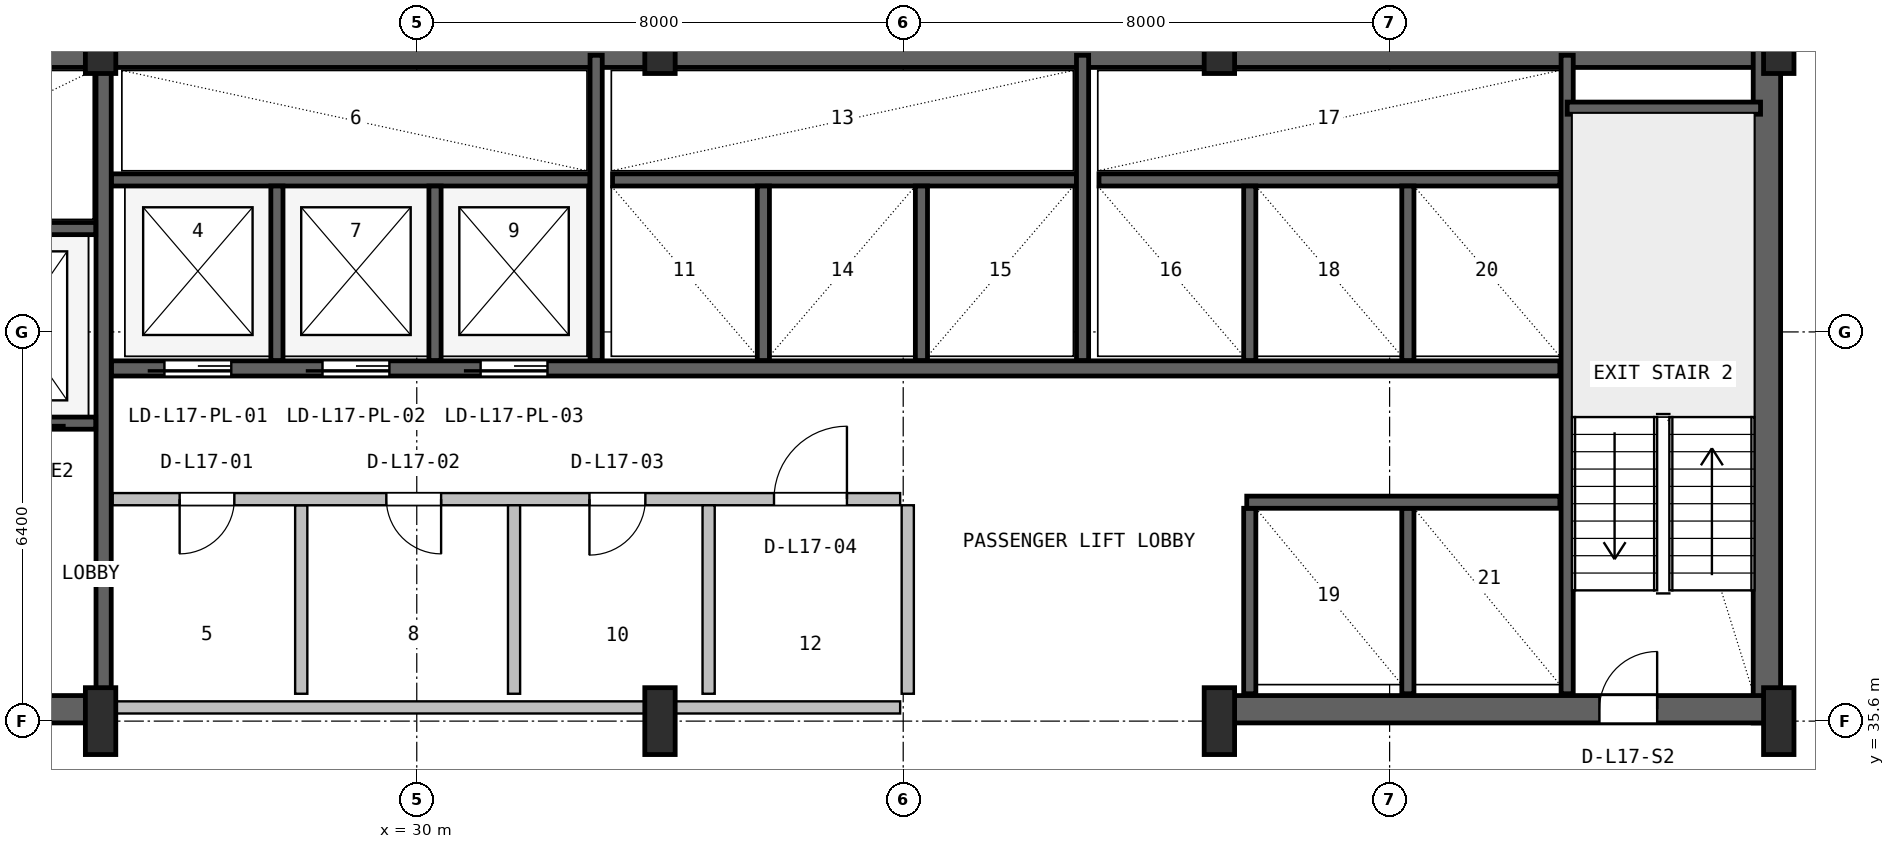
"""IFC4 building model, lengths in metres.
Left out: names, types, materials, properties, quantities, classifications, styles, units other than length and angle.
Written with IfcOpenShell. Run it as: python <this file> out.ifc"""

import sys

from ifc_helpers import new_model, si_unit, direction, frame, frame_2d, origin, origin_2d, place, context, subcontext, project, spatial, rectangle, i_section, extrude, source, transform, mapped, element, fill, save


model = new_model("IFC4")
c1 = context("Model", 3, precision=1e-05, world=origin(), true_north=direction((0.0, 1.0)))
c2 = subcontext(c1, "Body", "Model", "MODEL_VIEW")
j1 = project(units=[si_unit("LENGTHUNIT", "METRE"), si_unit("PLANEANGLEUNIT", "RADIAN")], contexts=[c1])
p1 = place(None, origin())
s1 = spatial("IfcSite", under=j1, at=p1, CompositionType="ELEMENT")
p2 = place(p1, origin())
s2 = spatial("IfcBuilding", under=s1, at=p2, CompositionType="ELEMENT")
p3 = place(p2, frame((0.0, 0.0, 74.4)))
s3 = spatial("IfcBuildingStorey", under=s2, at=p3, CompositionType="ELEMENT", Elevation=74.4)
p4 = place(p3, frame((15.6, 46.575, 0.0), z_axis=(0.0, 0.0, 1.0), x_axis=(1.0, 0.0, 0.0)))
e1 = element("IfcWall", 1, at=p4, inside=s3, PredefinedType="SHEAR", context=c2, shape_type="SweptSolid", body=[
    extrude(rectangle(XDim=36.8, YDim=0.45, at=frame_2d((18.4, 0.0))), origin(), (0.0, 0.0, 1.0), 3.65),
])
p5 = place(p3, frame((52.205, 35.57, 0.0), z_axis=(0.0, 0.0, 1.0), x_axis=(0.0, 1.0, 0.0)))
e2 = element("IfcWall", 2, at=p5, inside=s3, PredefinedType="SHEAR", context=c2, shape_type="SweptSolid", body=[
    extrude(rectangle(XDim=11.23, YDim=0.45, at=frame_2d((5.615, 0.0))), origin(), (0.0, 0.0, 1.0), 3.65),
])
p6 = place(p3, frame((15.57, 35.795, 0.0), z_axis=(0.0, 0.0, 1.0), x_axis=(1.0, 0.0, 0.0)))
e3 = element("IfcWall", 3, at=p6, inside=s3, PredefinedType="SHEAR", context=c2, shape_type="SweptSolid", body=[
    extrude(rectangle(XDim=9.23, YDim=0.45, at=frame_2d((4.615, 0.0))), origin(), (0.0, 0.0, 1.0), 3.65),
])
p7 = place(p6, frame((5.4, 0.0, 0.0)))
e4 = element("IfcOpeningElement", 4, at=p7, cuts=e3, PredefinedType="OPENING", context=c2, shape_type="SweptSolid", body=[
    extrude(rectangle(XDim=1.0, YDim=2.1, at=frame_2d((0.5, 1.05))), frame((0.0, 0.235, 0.0), z_axis=(0.0, -1.0, 0.0), x_axis=(1.0, 0.0, 0.0)), (0.0, 0.0, 1.0), 0.47),
])
p8 = place(p3, frame((43.2, 35.795, 0.0), z_axis=(0.0, 0.0, 1.0), x_axis=(1.0, 0.0, 0.0)))
e5 = element("IfcWall", 5, at=p8, inside=s3, PredefinedType="SHEAR", context=c2, shape_type="SweptSolid", body=[
    extrude(rectangle(XDim=9.23, YDim=0.45, at=frame_2d((4.615, 0.0))), origin(), (0.0, 0.0, 1.0), 3.65),
])
p9 = place(p8, frame((6.25, 0.0, 0.0)))
e6 = element("IfcOpeningElement", 6, at=p9, cuts=e5, PredefinedType="OPENING", context=c2, shape_type="SweptSolid", body=[
    extrude(rectangle(XDim=0.95, YDim=2.1, at=frame_2d((0.475, 1.05))), frame((0.0, 0.235, 0.0), z_axis=(0.0, -1.0, 0.0), x_axis=(1.0, 0.0, 0.0)), (0.0, 0.0, 1.0), 0.47),
])
m1 = source(origin(), c2, "Body", "SweptSolid", [
    extrude(i_section(OverallWidth=0.5, OverallDepth=1.1, WebThickness=0.018, FlangeThickness=0.032, FilletRadius=0.018, at=origin_2d()), origin(), (0.0, 0.0, 1.0), 3.9),
])
for number, where, z_axis, x_axis in (
    (7, (24.8, 35.6, 0.0), (0.0, 0.0, 1.0), (1.0, 0.0, 0.0)),
    (8, (24.8, 46.8, 0.0), (0.0, 0.0, 1.0), (1.0, 0.0, 0.0)),
    (9, (34.0, 35.6, 0.0), (0.0, 0.0, 1.0), (1.0, 0.0, 0.0)),
    (10, (34.0, 46.8, 0.0), (0.0, 0.0, 1.0), (1.0, 0.0, 0.0)),
    (11, (43.2, 35.6, 0.0), (0.0, 0.0, 1.0), (1.0, 0.0, 0.0)),
    (12, (43.2, 46.8, 0.0), (0.0, 0.0, 1.0), (1.0, 0.0, 0.0)),
    (13, (52.4, 35.6, 0.0), (0.0, 0.0, 1.0), (1.0, 0.0, 0.0)),
    (14, (52.4, 46.8, 0.0), (0.0, 0.0, 1.0), (1.0, 0.0, 0.0)),
):
    element("IfcColumn", number, at=place(p3, frame(where, z_axis=z_axis, x_axis=x_axis)), inside=s3, PredefinedType="COLUMN", context=c2, shape_type="MappedRepresentation", body=[
        mapped(m1, transform((0.0, 0.0, 0.0), x_axis=(1.0, 0.0, 0.0), y_axis=(0.0, 1.0, 0.0), z_axis=(0.0, 0.0, 1.0), scale=1.0)),
    ])
p10 = place(p3, frame((24.85, 36.05, 0.0), z_axis=(0.0, 0.0, 1.0), x_axis=(0.0, 1.0, 0.0)))
e15 = element("IfcWall", 15, at=p10, inside=s3, PredefinedType="SHEAR", context=c2, shape_type="SweptSolid", body=[
    extrude(rectangle(XDim=10.45, YDim=0.25, at=frame_2d((5.225, 0.0))), origin(), (0.0, 0.0, 1.0), 3.65),
])
p11 = place(p3, frame((19.2, 40.5, 0.0), z_axis=(0.0, 0.0, 1.0), x_axis=(1.0, 0.0, 0.0)))
e16 = element("IfcWall", 16, at=p11, inside=s3, PredefinedType="SHEAR", context=c2, shape_type="SweptSolid", body=[
    extrude(rectangle(XDim=5.52, YDim=0.2, at=frame_2d((2.76, 0.0))), origin(), (0.0, 0.0, 1.0), 3.65),
])
p12 = place(p11, frame((1.05, 0.0, 0.0)))
e17 = element("IfcOpeningElement", 17, at=p12, cuts=e16, PredefinedType="OPENING", context=c2, shape_type="SweptSolid", body=[
    extrude(rectangle(XDim=1.1, YDim=2.18, at=frame_2d((0.55, 1.09))), frame((0.0, 0.11, 0.0), z_axis=(0.0, -1.0, 0.0), x_axis=(1.0, 0.0, 0.0)), (0.0, 0.0, 1.0), 0.22),
])
p13 = place(p11, frame((3.65, 0.0, 0.0)))
e18 = element("IfcOpeningElement", 18, at=p13, cuts=e16, PredefinedType="OPENING", context=c2, shape_type="SweptSolid", body=[
    extrude(rectangle(XDim=1.1, YDim=2.18, at=frame_2d((0.55, 1.09))), frame((0.0, 0.11, 0.0), z_axis=(0.0, -1.0, 0.0), x_axis=(1.0, 0.0, 0.0)), (0.0, 0.0, 1.0), 0.22),
])
p14 = place(p3, frame((19.2, 43.7, 0.0), z_axis=(0.0, 0.0, 1.0), x_axis=(1.0, 0.0, 0.0)))
e19 = element("IfcWall", 19, at=p14, inside=s3, PredefinedType="SHEAR", context=c2, shape_type="SweptSolid", body=[
    extrude(rectangle(XDim=5.52, YDim=0.2, at=frame_2d((2.76, 0.0))), origin(), (0.0, 0.0, 1.0), 3.65),
])
p15 = place(p3, frame((48.92, 36.05, 0.0), z_axis=(0.0, 0.0, 1.0), x_axis=(0.0, 1.0, 0.0)))
e20 = element("IfcWall", 20, at=p15, inside=s3, PredefinedType="SHEAR", context=c2, shape_type="SweptSolid", body=[
    extrude(rectangle(XDim=10.5, YDim=0.2, at=frame_2d((5.25, 0.0))), origin(), (0.0, 0.0, 1.0), 3.65),
])
p16 = place(p3, frame((48.92, 45.68, 0.0), z_axis=(0.0, 0.0, 1.0), x_axis=(1.0, 0.0, 0.0)))
e21 = element("IfcWall", 21, at=p16, inside=s3, PredefinedType="SHEAR", context=c2, shape_type="SweptSolid", body=[
    extrude(rectangle(XDim=3.18, YDim=0.2, at=frame_2d((1.59, 0.0))), origin(), (0.0, 0.0, 1.0), 3.65),
])
p17 = place(p3, frame((24.98, 41.4, 0.0), z_axis=(0.0, 0.0, 1.0), x_axis=(1.0, 0.0, 0.0)))
e22 = element("IfcWall", 22, at=p17, inside=s3, PredefinedType="SHEAR", context=c2, shape_type="SweptSolid", body=[
    extrude(rectangle(XDim=23.82, YDim=0.25, at=frame_2d((11.91, 0.0))), origin(), (0.0, 0.0, 1.0), 3.65),
])
p18 = place(p17, frame((0.87, 0.0, 0.0)))
e23 = element("IfcOpeningElement", 23, at=p18, cuts=e22, PredefinedType="OPENING", context=c2, shape_type="SweptSolid", body=[
    extrude(rectangle(XDim=1.1, YDim=2.18, at=frame_2d((0.55, 1.09))), frame((0.0, 0.135, 0.0), z_axis=(0.0, -1.0, 0.0), x_axis=(1.0, 0.0, 0.0)), (0.0, 0.0, 1.0), 0.27),
])
p19 = place(p17, frame((3.47, 0.0, 0.0)))
e24 = element("IfcOpeningElement", 24, at=p19, cuts=e22, PredefinedType="OPENING", context=c2, shape_type="SweptSolid", body=[
    extrude(rectangle(XDim=1.1, YDim=2.18, at=frame_2d((0.55, 1.09))), frame((0.0, 0.135, 0.0), z_axis=(0.0, -1.0, 0.0), x_axis=(1.0, 0.0, 0.0)), (0.0, 0.0, 1.0), 0.27),
])
p20 = place(p17, frame((6.07, 0.0, 0.0)))
e25 = element("IfcOpeningElement", 25, at=p20, cuts=e22, PredefinedType="OPENING", context=c2, shape_type="SweptSolid", body=[
    extrude(rectangle(XDim=1.1, YDim=2.18, at=frame_2d((0.55, 1.09))), frame((0.0, 0.135, 0.0), z_axis=(0.0, -1.0, 0.0), x_axis=(1.0, 0.0, 0.0)), (0.0, 0.0, 1.0), 0.27),
])
p21 = place(p3, frame((24.98, 44.5, 0.0), z_axis=(0.0, 0.0, 1.0), x_axis=(1.0, 0.0, 0.0)))
e26 = element("IfcWall", 26, at=p21, inside=s3, PredefinedType="SHEAR", context=c2, shape_type="SweptSolid", body=[
    extrude(rectangle(XDim=7.87, YDim=0.2, at=frame_2d((3.935, 0.0))), origin(), (0.0, 0.0, 1.0), 3.65),
])
for number, where, z_axis, x_axis in (
    (27, (27.7, 41.53, 0.0), (0.0, 0.0, 1.0), (0.0, 1.0, 0.0)),
    (28, (30.3, 41.53, 0.0), (0.0, 0.0, 1.0), (0.0, 1.0, 0.0)),
):
    element("IfcWall", number, at=place(p3, frame(where, z_axis=z_axis, x_axis=x_axis)), inside=s3, PredefinedType="SHEAR", context=c2, shape_type="SweptSolid", body=[
        extrude(rectangle(XDim=2.87, YDim=0.2, at=frame_2d((1.435, 0.0))), origin(), (0.0, 0.0, 1.0), 3.65),
    ])
p22 = place(p3, frame((32.95, 41.53, 0.0), z_axis=(0.0, 0.0, 1.0), x_axis=(0.0, 1.0, 0.0)))
e29 = element("IfcWall", 29, at=p22, inside=s3, PredefinedType="SHEAR", context=c2, shape_type="SweptSolid", body=[
    extrude(rectangle(XDim=5.02, YDim=0.2, at=frame_2d((2.51, 0.0))), origin(), (0.0, 0.0, 1.0), 3.65),
])
p23 = place(p3, frame((33.22, 44.5, 0.0), z_axis=(0.0, 0.0, 1.0), x_axis=(1.0, 0.0, 0.0)))
e30 = element("IfcWall", 30, at=p23, inside=s3, PredefinedType="SHEAR", context=c2, shape_type="SweptSolid", body=[
    extrude(rectangle(XDim=7.63, YDim=0.2, at=frame_2d((3.815, 0.0))), origin(), (0.0, 0.0, 1.0), 3.65),
])
for number, where, z_axis, x_axis in (
    (31, (35.7, 41.53, 0.0), (0.0, 0.0, 1.0), (0.0, 1.0, 0.0)),
    (32, (38.3, 41.53, 0.0), (0.0, 0.0, 1.0), (0.0, 1.0, 0.0)),
):
    element("IfcWall", number, at=place(p3, frame(where, z_axis=z_axis, x_axis=x_axis)), inside=s3, PredefinedType="SHEAR", context=c2, shape_type="SweptSolid", body=[
        extrude(rectangle(XDim=2.87, YDim=0.2, at=frame_2d((1.435, 0.0))), origin(), (0.0, 0.0, 1.0), 3.65),
    ])
p24 = place(p3, frame((40.95, 41.53, 0.0), z_axis=(0.0, 0.0, 1.0), x_axis=(0.0, 1.0, 0.0)))
e33 = element("IfcWall", 33, at=p24, inside=s3, PredefinedType="SHEAR", context=c2, shape_type="SweptSolid", body=[
    extrude(rectangle(XDim=5.02, YDim=0.2, at=frame_2d((2.51, 0.0))), origin(), (0.0, 0.0, 1.0), 3.65),
])
p25 = place(p3, frame((41.22, 44.5, 0.0), z_axis=(0.0, 0.0, 1.0), x_axis=(1.0, 0.0, 0.0)))
e34 = element("IfcWall", 34, at=p25, inside=s3, PredefinedType="SHEAR", context=c2, shape_type="SweptSolid", body=[
    extrude(rectangle(XDim=7.58, YDim=0.2, at=frame_2d((3.79, 0.0))), origin(), (0.0, 0.0, 1.0), 3.65),
])
for number, where, z_axis, x_axis in (
    (35, (43.7, 41.53, 0.0), (0.0, 0.0, 1.0), (0.0, 1.0, 0.0)),
    (36, (46.3, 41.53, 0.0), (0.0, 0.0, 1.0), (0.0, 1.0, 0.0)),
):
    element("IfcWall", number, at=place(p3, frame(where, z_axis=z_axis, x_axis=x_axis)), inside=s3, PredefinedType="SHEAR", context=c2, shape_type="SweptSolid", body=[
        extrude(rectangle(XDim=2.87, YDim=0.2, at=frame_2d((1.435, 0.0))), origin(), (0.0, 0.0, 1.0), 3.65),
    ])
for number, where, z_axis, x_axis in (
    (37, (43.7, 36.05, 0.0), (0.0, 0.0, 1.0), (0.0, 1.0, 0.0)),
    (38, (46.3, 36.05, 0.0), (0.0, 0.0, 1.0), (0.0, 1.0, 0.0)),
):
    element("IfcWall", number, at=place(p3, frame(where, z_axis=z_axis, x_axis=x_axis)), inside=s3, PredefinedType="SHEAR", context=c2, shape_type="SweptSolid", body=[
        extrude(rectangle(XDim=3.05, YDim=0.2, at=frame_2d((1.525, 0.0))), origin(), (0.0, 0.0, 1.0), 3.65),
    ])
p26 = place(p3, frame((43.65, 39.2, 0.0), z_axis=(0.0, 0.0, 1.0), x_axis=(1.0, 0.0, 0.0)))
e39 = element("IfcWall", 39, at=p26, inside=s3, PredefinedType="SHEAR", context=c2, shape_type="SweptSolid", body=[
    extrude(rectangle(XDim=5.15, YDim=0.2, at=frame_2d((2.575, 0.0))), origin(), (0.0, 0.0, 1.0), 3.65),
])
p27 = place(p3, frame((25.0, 35.825, 0.0), z_axis=(0.0, 0.0, 1.0), x_axis=(1.0, 0.0, 0.0)))
e40 = element("IfcWall", 40, at=p27, inside=s3, PredefinedType="SOLIDWALL", context=c2, shape_type="SweptSolid", body=[
    extrude(rectangle(XDim=12.95, YDim=0.2, at=frame_2d((6.475, 0.0))), origin(), (0.0, 0.0, 1.0), 2.425),
])
p28 = place(p3, frame((28.1, 36.05, 0.0), z_axis=(0.0, 0.0, 1.0), x_axis=(0.0, 1.0, 0.0)))
e41 = element("IfcWall", 41, at=p28, inside=s3, PredefinedType="PLUMBINGWALL", context=c2, shape_type="SweptSolid", body=[
    extrude(rectangle(XDim=3.1, YDim=0.2, at=frame_2d((1.55, 0.0))), origin(), (0.0, 0.0, 1.0), 3.63),
])
p29 = place(p3, frame((25.0, 39.25, 0.0), z_axis=(0.0, 0.0, 1.0), x_axis=(1.0, 0.0, 0.0)))
e42 = element("IfcWall", 42, at=p29, inside=s3, PredefinedType="SOLIDWALL", context=c2, shape_type="SweptSolid", body=[
    extrude(rectangle(XDim=12.95, YDim=0.2, at=frame_2d((6.475, 0.0))), origin(), (0.0, 0.0, 1.0), 3.63),
])
p30 = place(p29, frame((1.1, 0.0, 0.0)))
e43 = element("IfcOpeningElement", 43, at=p30, cuts=e42, PredefinedType="OPENING", context=c2, shape_type="SweptSolid", body=[
    extrude(rectangle(XDim=0.9, YDim=2.06, at=frame_2d((0.45, 1.03))), frame((0.0, 0.11, 0.0), z_axis=(0.0, -1.0, 0.0), x_axis=(1.0, 0.0, 0.0)), (0.0, 0.0, 1.0), 0.22),
])
p31 = place(p29, frame((4.5, 0.0, 0.0)))
e44 = element("IfcOpeningElement", 44, at=p31, cuts=e42, PredefinedType="OPENING", context=c2, shape_type="SweptSolid", body=[
    extrude(rectangle(XDim=0.9, YDim=2.06, at=frame_2d((0.45, 1.03))), frame((0.0, 0.11, 0.0), z_axis=(0.0, -1.0, 0.0), x_axis=(1.0, 0.0, 0.0)), (0.0, 0.0, 1.0), 0.22),
])
p32 = place(p29, frame((7.84, 0.0, 0.0)))
e45 = element("IfcOpeningElement", 45, at=p32, cuts=e42, PredefinedType="OPENING", context=c2, shape_type="SweptSolid", body=[
    extrude(rectangle(XDim=0.92, YDim=2.08, at=frame_2d((0.46, 1.04))), frame((0.0, 0.11, 0.0), z_axis=(0.0, -1.0, 0.0), x_axis=(1.0, 0.0, 0.0)), (0.0, 0.0, 1.0), 0.22),
])
p33 = place(p29, frame((10.875, 0.0, 0.0)))
e46 = element("IfcOpeningElement", 46, at=p33, cuts=e42, PredefinedType="OPENING", context=c2, shape_type="SweptSolid", body=[
    extrude(rectangle(XDim=1.2, YDim=2.1, at=frame_2d((0.6, 1.05))), frame((0.0, 0.11, 0.0), z_axis=(0.0, -1.0, 0.0), x_axis=(1.0, 0.0, 0.0)), (0.0, 0.0, 1.0), 0.22),
])
p34 = place(p3, frame((31.6, 36.05, 0.0), z_axis=(0.0, 0.0, 1.0), x_axis=(0.0, 1.0, 0.0)))
e47 = element("IfcWall", 47, at=p34, inside=s3, PredefinedType="PLUMBINGWALL", context=c2, shape_type="SweptSolid", body=[
    extrude(rectangle(XDim=3.1, YDim=0.2, at=frame_2d((1.55, 0.0))), origin(), (0.0, 0.0, 1.0), 3.63),
])
for number, where, z_axis, x_axis in (
    (48, (34.8, 36.05, 0.0), (0.0, 0.0, 1.0), (0.0, 1.0, 0.0)),
    (49, (38.075, 36.05, 0.0), (0.0, 0.0, 1.0), (0.0, 1.0, 0.0)),
):
    element("IfcWall", number, at=place(p3, frame(where, z_axis=z_axis, x_axis=x_axis)), inside=s3, PredefinedType="SOLIDWALL", context=c2, shape_type="SweptSolid", body=[
        extrude(rectangle(XDim=3.1, YDim=0.2, at=frame_2d((1.55, 0.0))), origin(), (0.0, 0.0, 1.0), 3.63),
    ])
m2 = source(origin(), c2, "Body", "SweptSolid", [
    extrude(rectangle(XDim=0.95, YDim=2.1, at=frame_2d((0.475, 1.05))), frame((0.0, 0.025, 0.0), z_axis=(0.0, -1.0, 0.0), x_axis=(1.0, 0.0, 0.0)), (0.0, 0.0, 1.0), 0.05),
])
p35 = place(p9, origin())
e50 = element("IfcDoor", 50, at=p35, inside=s3, OperationType="SINGLE_SWING_RIGHT", PredefinedType="DOOR", context=c2, shape_type="MappedRepresentation", body=[
    mapped(m2, transform((0.0, 0.0, 0.0), x_axis=(1.0, 0.0, 0.0), y_axis=(0.0, 1.0, 0.0), z_axis=(0.0, 0.0, 1.0), scale=1.0)),
])
fill(e6, e50)
m3 = source(origin(), c2, "Body", "SweptSolid", [
    extrude(rectangle(XDim=1.1, YDim=2.18, at=frame_2d((0.55, 1.09))), frame((0.0, 0.025, 0.0), z_axis=(0.0, -1.0, 0.0), x_axis=(1.0, 0.0, 0.0)), (0.0, 0.0, 1.0), 0.05),
])
p36 = place(p18, frame((1.1, 0.0, 0.0), z_axis=(0.0, 0.0, 1.0), x_axis=(-1.0, 0.0, 0.0)))
e51 = element("IfcDoor", 51, at=p36, inside=s3, OperationType="SLIDING_TO_LEFT", PredefinedType="DOOR", context=c2, shape_type="MappedRepresentation", body=[
    mapped(m3, transform((0.0, 0.0, 0.0), x_axis=(1.0, 0.0, 0.0), y_axis=(0.0, 1.0, 0.0), z_axis=(0.0, 0.0, 1.0), scale=1.0)),
])
fill(e23, e51)
p37 = place(p19, frame((1.1, 0.0, 0.0), z_axis=(0.0, 0.0, 1.0), x_axis=(-1.0, 0.0, 0.0)))
e52 = element("IfcDoor", 52, at=p37, inside=s3, OperationType="SLIDING_TO_LEFT", PredefinedType="DOOR", context=c2, shape_type="MappedRepresentation", body=[
    mapped(m3, transform((0.0, 0.0, 0.0), x_axis=(1.0, 0.0, 0.0), y_axis=(0.0, 1.0, 0.0), z_axis=(0.0, 0.0, 1.0), scale=1.0)),
])
fill(e24, e52)
p38 = place(p20, frame((1.1, 0.0, 0.0), z_axis=(0.0, 0.0, 1.0), x_axis=(-1.0, 0.0, 0.0)))
e53 = element("IfcDoor", 53, at=p38, inside=s3, OperationType="SLIDING_TO_LEFT", PredefinedType="DOOR", context=c2, shape_type="MappedRepresentation", body=[
    mapped(m3, transform((0.0, 0.0, 0.0), x_axis=(1.0, 0.0, 0.0), y_axis=(0.0, 1.0, 0.0), z_axis=(0.0, 0.0, 1.0), scale=1.0)),
])
fill(e25, e53)
m4 = source(origin(), c2, "Body", "SweptSolid", [
    extrude(rectangle(XDim=0.9, YDim=2.06, at=frame_2d((0.45, 1.03))), frame((0.0, 0.025, 0.0), z_axis=(0.0, -1.0, 0.0), x_axis=(1.0, 0.0, 0.0)), (0.0, 0.0, 1.0), 0.05),
])
p39 = place(p30, frame((0.9, 0.0, 0.0), z_axis=(0.0, 0.0, 1.0), x_axis=(-1.0, 0.0, 0.0)))
e54 = element("IfcDoor", 54, at=p39, inside=s3, OperationType="SINGLE_SWING_LEFT", PredefinedType="DOOR", context=c2, shape_type="MappedRepresentation", body=[
    mapped(m4, transform((0.0, 0.0, 0.0), x_axis=(1.0, 0.0, 0.0), y_axis=(0.0, 1.0, 0.0), z_axis=(0.0, 0.0, 1.0), scale=1.0)),
])
fill(e43, e54)
p40 = place(p31, frame((0.9, 0.0, 0.0), z_axis=(0.0, 0.0, 1.0), x_axis=(-1.0, 0.0, 0.0)))
e55 = element("IfcDoor", 55, at=p40, inside=s3, OperationType="SINGLE_SWING_RIGHT", PredefinedType="DOOR", context=c2, shape_type="MappedRepresentation", body=[
    mapped(m4, transform((0.0, 0.0, 0.0), x_axis=(1.0, 0.0, 0.0), y_axis=(0.0, 1.0, 0.0), z_axis=(0.0, 0.0, 1.0), scale=1.0)),
])
fill(e44, e55)
m5 = source(origin(), c2, "Body", "SweptSolid", [
    extrude(rectangle(XDim=0.92, YDim=2.08, at=frame_2d((0.46, 1.04))), frame((0.0, 0.025, 0.0), z_axis=(0.0, -1.0, 0.0), x_axis=(1.0, 0.0, 0.0)), (0.0, 0.0, 1.0), 0.05),
])
p41 = place(p32, frame((0.92, 0.0, 0.0), z_axis=(0.0, 0.0, 1.0), x_axis=(-1.0, 0.0, 0.0)))
e56 = element("IfcDoor", 56, at=p41, inside=s3, OperationType="SINGLE_SWING_LEFT", PredefinedType="DOOR", context=c2, shape_type="MappedRepresentation", body=[
    mapped(m5, transform((0.0, 0.0, 0.0), x_axis=(1.0, 0.0, 0.0), y_axis=(0.0, 1.0, 0.0), z_axis=(0.0, 0.0, 1.0), scale=1.0)),
])
fill(e45, e56)
m6 = source(origin(), c2, "Body", "SweptSolid", [
    extrude(rectangle(XDim=1.2, YDim=2.1, at=frame_2d((0.6, 1.05))), frame((0.0, 0.025, 0.0), z_axis=(0.0, -1.0, 0.0), x_axis=(1.0, 0.0, 0.0)), (0.0, 0.0, 1.0), 0.05),
])
p42 = place(p33, origin())
e57 = element("IfcDoor", 57, at=p42, inside=s3, OperationType="SINGLE_SWING_RIGHT", PredefinedType="DOOR", context=c2, shape_type="MappedRepresentation", body=[
    mapped(m6, transform((0.0, 0.0, 0.0), x_axis=(1.0, 0.0, 0.0), y_axis=(0.0, 1.0, 0.0), z_axis=(0.0, 0.0, 1.0), scale=1.0)),
])
fill(e46, e57)
save(model, sys.argv[1])
